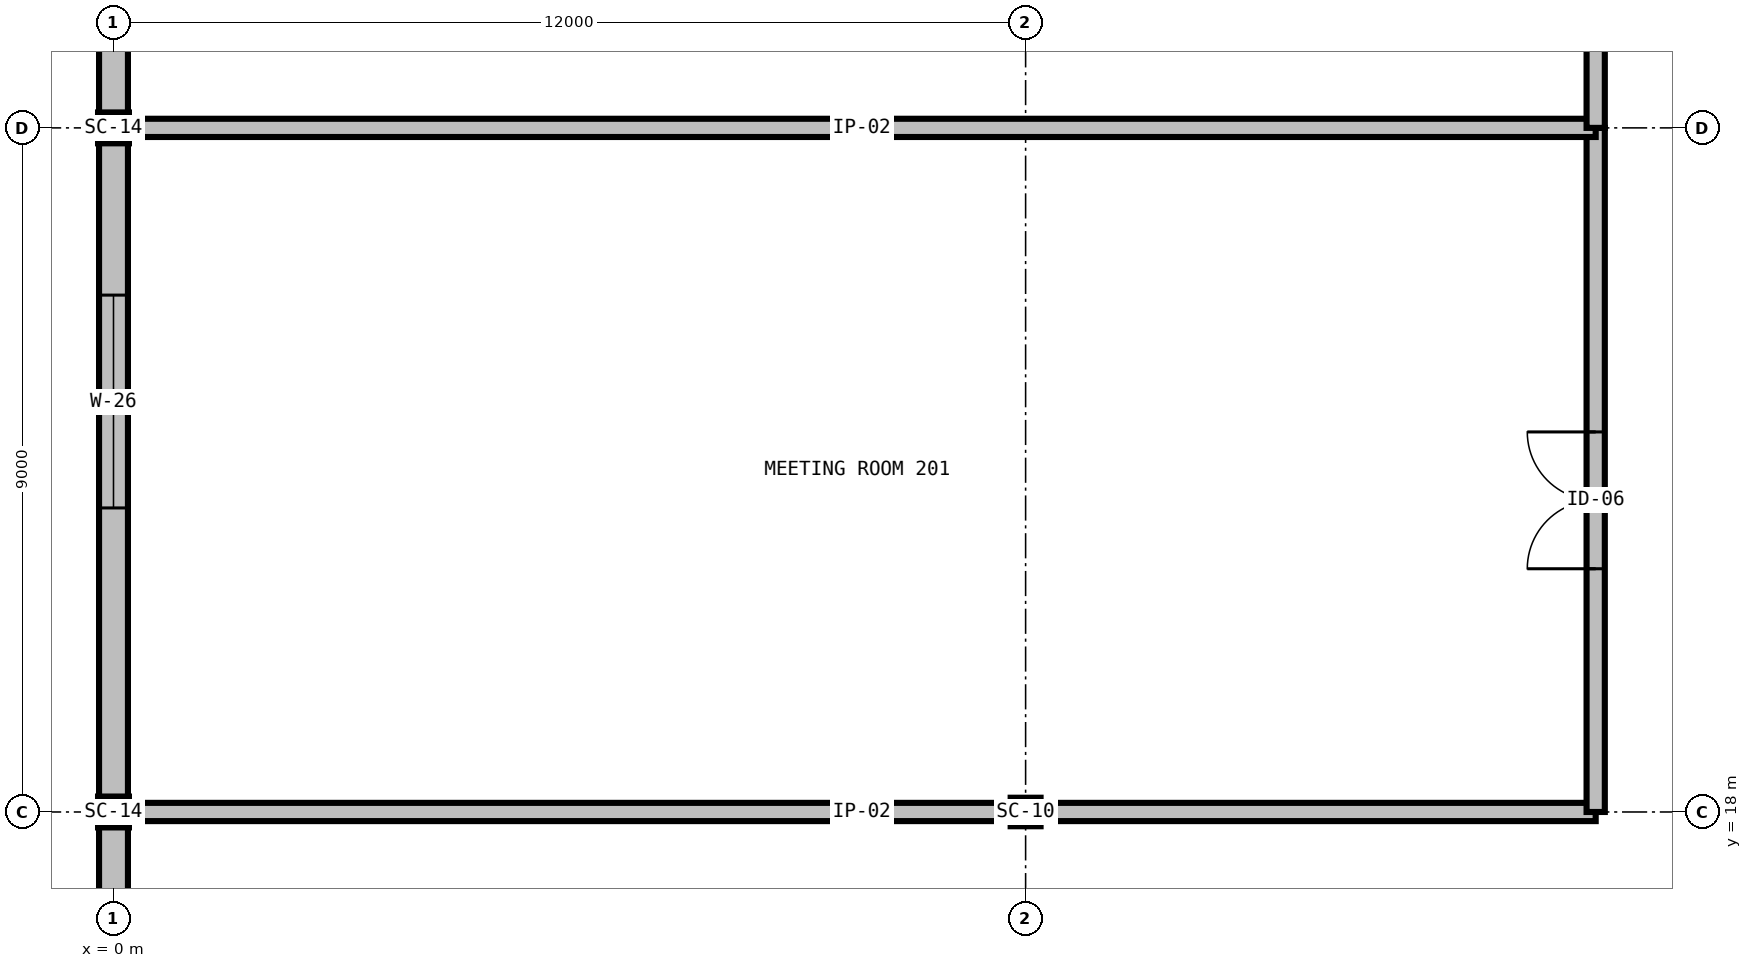
"""IFC4 building model, lengths in metres.
Left out: names, types, materials, properties, quantities, classifications, styles, units other than length and angle.
Written with IfcOpenShell. Run it as: python <this file> out.ifc"""

import sys

from ifc_helpers import new_model, si_unit, direction, frame, frame_2d, origin, origin_2d, place, context, subcontext, project, spatial, rectangle, hollow_rectangle, i_section, extrude, element, fill, save


model = new_model("IFC4")
c1 = context("Model", 3, precision=1e-05, world=origin(), true_north=direction((0.0, 1.0)))
c2 = subcontext(c1, "Body", "Model", "MODEL_VIEW")
j1 = project(units=[si_unit("LENGTHUNIT", "METRE"), si_unit("PLANEANGLEUNIT", "RADIAN")], contexts=[c1])
p1 = place(None, origin())
s1 = spatial("IfcSite", under=j1, at=p1, CompositionType="ELEMENT")
p2 = place(p1, origin())
s2 = spatial("IfcBuilding", under=s1, at=p2, CompositionType="ELEMENT")
p3 = place(p2, frame((0.0, 0.0, 12.0)))
s3 = spatial("IfcBuildingStorey", under=s2, at=p3, CompositionType="ELEMENT", Elevation=12.0)
for number, where, z_axis, x_axis in (
    (1, (0.0, 18.0, 0.0), (0.0, 0.0, 1.0), (1.0, 0.0, 0.0)),
    (2, (0.0, 27.0, 0.0), (0.0, 0.0, 1.0), (1.0, 0.0, 0.0)),
):
    element("IfcColumn", number, at=place(p3, frame(where, z_axis=z_axis, x_axis=x_axis)), inside=s3, PredefinedType="COLUMN", context=c2, shape_type="SweptSolid", body=[
        extrude(hollow_rectangle(XDim=0.406, YDim=0.406, WallThickness=0.015, at=origin_2d()), origin(), (0.0, 0.0, 1.0), 6.0),
    ])
p4 = place(p3, frame((12.0, 18.0, 0.0), z_axis=(0.0, 0.0, 1.0), x_axis=(1.0, 0.0, 0.0)))
e3 = element("IfcColumn", 3, at=p4, inside=s3, PredefinedType="COLUMN", context=c2, shape_type="SweptSolid", body=[
    extrude(i_section(OverallWidth=0.394, OverallDepth=0.375, WebThickness=0.017, FlangeThickness=0.028, FilletRadius=0.031, at=origin_2d()), origin(), (0.0, 0.0, 1.0), 6.0),
])
p5 = place(p3, frame((0.0, 18.0, 0.0), z_axis=(0.0, 0.0, 1.0), x_axis=(0.0, -1.0, 0.0)))
e4 = element("IfcWall", 4, at=p5, inside=s3, PredefinedType="STANDARD", context=c2, shape_type="SweptSolid", body=[
    extrude(rectangle(XDim=9.0, YDim=0.38, at=frame_2d((4.5, 0.0))), origin(), (0.0, 0.0, 1.0), 5.239),
])
p6 = place(p3, frame((0.0, 27.0, 0.0), z_axis=(0.0, 0.0, 1.0), x_axis=(0.0, -1.0, 0.0)))
e5 = element("IfcWall", 5, at=p6, inside=s3, PredefinedType="STANDARD", context=c2, shape_type="SweptSolid", body=[
    extrude(rectangle(XDim=9.0, YDim=0.38, at=frame_2d((4.5, 0.0))), origin(), (0.0, 0.0, 1.0), 5.239),
])
p7 = place(p6, frame((2.2, 0.0, 1.0)))
e6 = element("IfcOpeningElement", 6, at=p7, cuts=e5, PredefinedType="OPENING", context=c2, shape_type="SweptSolid", body=[
    extrude(rectangle(XDim=2.8, YDim=1.0, at=frame_2d((1.4, 0.5))), frame((0.0, 0.205, 0.0), z_axis=(0.0, -1.0, 0.0), x_axis=(1.0, 0.0, 0.0)), (0.0, 0.0, 1.0), 0.41),
])
p8 = place(p3, frame((0.0, 36.0, 0.0), z_axis=(0.0, 0.0, 1.0), x_axis=(0.0, -1.0, 0.0)))
e7 = element("IfcWall", 7, at=p8, inside=s3, PredefinedType="STANDARD", context=c2, shape_type="SweptSolid", body=[
    extrude(rectangle(XDim=9.0, YDim=0.38, at=frame_2d((4.5, 0.0))), origin(), (0.0, 0.0, 1.0), 5.239),
])
p9 = place(p8, frame((2.2, 0.0, 1.0)))
e8 = element("IfcOpeningElement", 8, at=p9, cuts=e7, PredefinedType="OPENING", context=c2, shape_type="SweptSolid", body=[
    extrude(rectangle(XDim=2.8, YDim=1.0, at=frame_2d((1.4, 0.5))), frame((0.0, 0.205, 0.0), z_axis=(0.0, -1.0, 0.0), x_axis=(1.0, 0.0, 0.0)), (0.0, 0.0, 1.0), 0.41),
])
p10 = place(p3, frame((0.19, 18.0, 0.0), z_axis=(0.0, 0.0, 1.0), x_axis=(1.0, 0.0, 0.0)))
e9 = element("IfcWall", 9, at=p10, inside=s3, PredefinedType="PARTITIONING", context=c2, shape_type="SweptSolid", body=[
    extrude(rectangle(XDim=19.31, YDim=0.24, at=frame_2d((9.655, 0.0))), origin(), (0.0, 0.0, 1.0), 4.872),
])
p11 = place(p3, frame((19.5, 18.0, 0.0), z_axis=(0.0, 0.0, 1.0), x_axis=(0.0, 1.0, 0.0)))
e10 = element("IfcWall", 10, at=p11, inside=s3, PredefinedType="PARTITIONING", context=c2, shape_type="SweptSolid", body=[
    extrude(rectangle(XDim=9.0, YDim=0.24, at=frame_2d((4.5, 0.0))), origin(), (0.0, 0.0, 1.0), 5.65),
])
p12 = place(p11, frame((3.2, 0.0, 0.0)))
e11 = element("IfcOpeningElement", 11, at=p12, cuts=e10, PredefinedType="OPENING", context=c2, shape_type="SweptSolid", body=[
    extrude(rectangle(XDim=1.8, YDim=2.3, at=frame_2d((0.9, 1.15))), frame((0.0, 0.135, 0.0), z_axis=(0.0, -1.0, 0.0), x_axis=(1.0, 0.0, 0.0)), (0.0, 0.0, 1.0), 0.27),
])
p13 = place(p3, frame((19.5, 27.0, 0.0), z_axis=(0.0, 0.0, 1.0), x_axis=(-1.0, 0.0, 0.0)))
e12 = element("IfcWall", 12, at=p13, inside=s3, PredefinedType="PARTITIONING", context=c2, shape_type="SweptSolid", body=[
    extrude(rectangle(XDim=19.31, YDim=0.24, at=frame_2d((9.655, 0.0))), origin(), (0.0, 0.0, 1.0), 4.528),
])
p14 = place(p3, frame((19.5, 27.0, 0.0), z_axis=(0.0, 0.0, 1.0), x_axis=(0.0, 1.0, 0.0)))
e13 = element("IfcWall", 13, at=p14, inside=s3, PredefinedType="PARTITIONING", context=c2, shape_type="SweptSolid", body=[
    extrude(rectangle(XDim=18.0, YDim=0.24, at=frame_2d((9.0, 0.0))), origin(), (0.0, 0.0, 1.0), 5.65),
])
p15 = place(p14, frame((6.5, 0.0, 0.0)))
e14 = element("IfcOpeningElement", 14, at=p15, cuts=e13, PredefinedType="OPENING", context=c2, shape_type="SweptSolid", body=[
    extrude(rectangle(XDim=1.8, YDim=2.3, at=frame_2d((0.9, 1.15))), frame((0.0, 0.135, 0.0), z_axis=(0.0, -1.0, 0.0), x_axis=(1.0, 0.0, 0.0)), (0.0, 0.0, 1.0), 0.27),
])
p16 = place(p7, origin())
e15 = element("IfcWindow", 15, at=p16, inside=s3, PartitioningType="DOUBLE_PANEL_HORIZONTAL", PredefinedType="WINDOW", context=c2, shape_type="SweptSolid", body=[
    extrude(rectangle(XDim=2.8, YDim=1.0, at=frame_2d((1.4, 0.5))), frame((0.0, 0.03, 0.0), z_axis=(0.0, -1.0, 0.0), x_axis=(1.0, 0.0, 0.0)), (0.0, 0.0, 1.0), 0.06),
])
fill(e6, e15)
p17 = place(p12, origin())
e16 = element("IfcDoor", 16, at=p17, inside=s3, OperationType="DOUBLE_DOOR_SINGLE_SWING", PredefinedType="DOOR", context=c2, shape_type="SweptSolid", body=[
    extrude(rectangle(XDim=1.8, YDim=2.3, at=frame_2d((0.9, 1.15))), frame((0.0, 0.025, 0.0), z_axis=(0.0, -1.0, 0.0), x_axis=(1.0, 0.0, 0.0)), (0.0, 0.0, 1.0), 0.05),
])
fill(e11, e16)
save(model, sys.argv[1])
